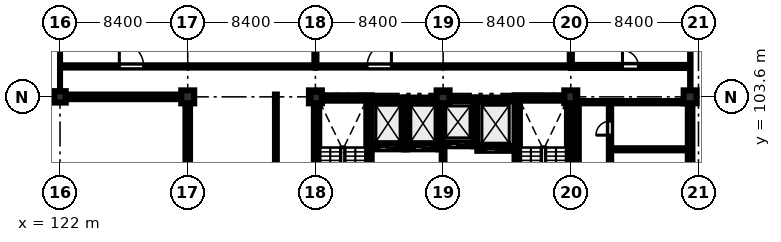
"""IFC4 building model, lengths in metres.
Left out: names, types, materials, properties, quantities, classifications, styles, units other than length and angle.
Written with IfcOpenShell. Run it as: python <this file> out.ifc"""

import sys

from ifc_helpers import new_model, si_unit, direction, frame, frame_2d, origin, origin_2d, place, context, subcontext, project, spatial, rectangle, extrude, element, fill, save


model = new_model("IFC4")
c1 = context("Model", 3, precision=1e-05, world=origin(), true_north=direction((0.0, 1.0)))
c2 = subcontext(c1, "Body", "Model", "MODEL_VIEW")
j1 = project(units=[si_unit("LENGTHUNIT", "METRE"), si_unit("PLANEANGLEUNIT", "RADIAN")], contexts=[c1])
p1 = place(None, origin())
s1 = spatial("IfcSite", under=j1, at=p1, CompositionType="ELEMENT")
p2 = place(p1, origin())
s2 = spatial("IfcBuilding", under=s1, at=p2, CompositionType="ELEMENT")
p3 = place(p2, frame((0.0, 0.0, 31.8)))
s3 = spatial("IfcBuildingStorey", under=s2, at=p3, CompositionType="ELEMENT", Elevation=31.8)
p4 = place(p3, frame((122.0, 103.6, 0.0), z_axis=(0.0, 0.0, 1.0), x_axis=(1.0, 0.0, 0.0)))
e1 = element("IfcColumn", 1, at=p4, inside=s3, PredefinedType="COLUMN", context=c2, shape_type="SweptSolid", body=[
    extrude(rectangle(XDim=0.75, YDim=0.75, at=origin_2d()), origin(), (0.0, 0.0, 1.0), 4.02),
])
for number, where, z_axis, x_axis in (
    (2, (130.4, 103.6, 0.0), (0.0, 0.0, 1.0), (1.0, 0.0, 0.0)),
    (3, (138.8, 103.6, 0.0), (0.0, 0.0, 1.0), (1.0, 0.0, 0.0)),
    (4, (147.2, 103.6, 0.0), (0.0, 0.0, 1.0), (1.0, 0.0, 0.0)),
    (5, (155.6, 103.6, 0.0), (0.0, 0.0, 1.0), (1.0, 0.0, 0.0)),
    (6, (163.45, 103.6, 0.0), (0.0, 0.0, 1.0), (1.0, 0.0, 0.0)),
):
    element("IfcColumn", number, at=place(p3, frame(where, z_axis=z_axis, x_axis=x_axis)), inside=s3, PredefinedType="COLUMN", context=c2, shape_type="SweptSolid", body=[
        extrude(rectangle(XDim=0.85, YDim=0.85, at=origin_2d()), origin(), (0.0, 0.0, 1.0), 4.02),
    ])
p5 = place(p3, frame((138.7, 103.525, 0.0), z_axis=(0.0, 0.0, 1.0), x_axis=(1.0, 0.0, 0.0)))
e7 = element("IfcWall", 7, at=p5, inside=s3, PredefinedType="SHEAR", context=c2, shape_type="SweptSolid", body=[
    extrude(rectangle(XDim=3.8, YDim=0.35, at=frame_2d((1.9, 0.0))), origin(), (0.0, 0.0, 1.0), 4.02),
])
p6 = place(p3, frame((138.875, 95.45, 0.0), z_axis=(0.0, 0.0, 1.0), x_axis=(0.0, 1.0, 0.0)))
e8 = element("IfcWall", 8, at=p6, inside=s3, PredefinedType="SHEAR", context=c2, shape_type="SweptSolid", body=[
    extrude(rectangle(XDim=7.9, YDim=0.35, at=frame_2d((3.95, 0.0))), origin(), (0.0, 0.0, 1.0), 4.02),
])
p7 = place(p3, frame((142.325, 95.45, 0.0), z_axis=(0.0, 0.0, 1.0), x_axis=(0.0, 1.0, 0.0)))
e9 = element("IfcWall", 9, at=p7, inside=s3, PredefinedType="SHEAR", context=c2, shape_type="SweptSolid", body=[
    extrude(rectangle(XDim=7.9, YDim=0.35, at=frame_2d((3.95, 0.0))), origin(), (0.0, 0.0, 1.0), 4.02),
])
p8 = place(p7, frame((0.22, 0.0, 0.0)))
e10 = element("IfcOpeningElement", 10, at=p8, cuts=e9, PredefinedType="OPENING", context=c2, shape_type="SweptSolid", body=[
    extrude(rectangle(XDim=1.15, YDim=2.15, at=frame_2d((0.575, 1.075))), frame((0.0, 0.185, 0.0), z_axis=(0.0, -1.0, 0.0), x_axis=(1.0, 0.0, 0.0)), (0.0, 0.0, 1.0), 0.37),
])
p9 = place(p3, frame((151.9, 103.525, 0.0), z_axis=(0.0, 0.0, 1.0), x_axis=(1.0, 0.0, 0.0)))
e11 = element("IfcWall", 11, at=p9, inside=s3, PredefinedType="SHEAR", context=c2, shape_type="SweptSolid", body=[
    extrude(rectangle(XDim=3.8, YDim=0.35, at=frame_2d((1.9, 0.0))), origin(), (0.0, 0.0, 1.0), 4.02),
])
p10 = place(p3, frame((152.075, 95.45, 0.0), z_axis=(0.0, 0.0, 1.0), x_axis=(0.0, 1.0, 0.0)))
e12 = element("IfcWall", 12, at=p10, inside=s3, PredefinedType="SHEAR", context=c2, shape_type="SweptSolid", body=[
    extrude(rectangle(XDim=7.9, YDim=0.35, at=frame_2d((3.95, 0.0))), origin(), (0.0, 0.0, 1.0), 4.02),
])
p11 = place(p10, frame((0.35, 0.0, 0.0)))
e13 = element("IfcOpeningElement", 13, at=p11, cuts=e12, PredefinedType="OPENING", context=c2, shape_type="SweptSolid", body=[
    extrude(rectangle(XDim=1.15, YDim=2.15, at=frame_2d((0.575, 1.075))), frame((0.0, 0.185, 0.0), z_axis=(0.0, -1.0, 0.0), x_axis=(1.0, 0.0, 0.0)), (0.0, 0.0, 1.0), 0.37),
])
p12 = place(p3, frame((155.525, 95.45, 0.0), z_axis=(0.0, 0.0, 1.0), x_axis=(0.0, 1.0, 0.0)))
e14 = element("IfcWall", 14, at=p12, inside=s3, PredefinedType="SHEAR", context=c2, shape_type="SweptSolid", body=[
    extrude(rectangle(XDim=7.9, YDim=0.35, at=frame_2d((3.95, 0.0))), origin(), (0.0, 0.0, 1.0), 4.02),
])
p13 = place(p3, frame((142.5, 100.275, 0.0), z_axis=(0.0, 0.0, 1.0), x_axis=(1.0, 0.0, 0.0)))
e15 = element("IfcWall", 15, at=p13, inside=s3, PredefinedType="SHEAR", context=c2, shape_type="SweptSolid", body=[
    extrude(rectangle(XDim=2.1, YDim=0.25, at=frame_2d((1.05, 0.0))), origin(), (0.0, 0.0, 1.0), 4.02),
])
p14 = place(p13, frame((0.5, 0.0, 0.0)))
e16 = element("IfcOpeningElement", 16, at=p14, cuts=e15, PredefinedType="OPENING", context=c2, shape_type="SweptSolid", body=[
    extrude(rectangle(XDim=1.1, YDim=2.15, at=frame_2d((0.55, 1.075))), frame((0.0, 0.135, 0.0), z_axis=(0.0, -1.0, 0.0), x_axis=(1.0, 0.0, 0.0)), (0.0, 0.0, 1.0), 0.27),
])
p15 = place(p3, frame((142.5, 103.425, 0.0), z_axis=(0.0, 0.0, 1.0), x_axis=(1.0, 0.0, 0.0)))
e17 = element("IfcWall", 17, at=p15, inside=s3, PredefinedType="SHEAR", context=c2, shape_type="SweptSolid", body=[
    extrude(rectangle(XDim=2.1, YDim=0.25, at=frame_2d((1.05, 0.0))), origin(), (0.0, 0.0, 1.0), 4.02),
])
p16 = place(p3, frame((144.725, 100.15, 0.0), z_axis=(0.0, 0.0, 1.0), x_axis=(0.0, 1.0, 0.0)))
e18 = element("IfcWall", 18, at=p16, inside=s3, PredefinedType="SHEAR", context=c2, shape_type="SweptSolid", body=[
    extrude(rectangle(XDim=3.4, YDim=0.25, at=frame_2d((1.7, 0.0))), origin(), (0.0, 0.0, 1.0), 4.02),
])
p17 = place(p3, frame((144.85, 100.275, 0.0), z_axis=(0.0, 0.0, 1.0), x_axis=(1.0, 0.0, 0.0)))
e19 = element("IfcWall", 19, at=p17, inside=s3, PredefinedType="SHEAR", context=c2, shape_type="SweptSolid", body=[
    extrude(rectangle(XDim=2.05, YDim=0.25, at=frame_2d((1.025, 0.0))), origin(), (0.0, 0.0, 1.0), 4.02),
])
p18 = place(p17, frame((0.465, 0.0, 0.0)))
e20 = element("IfcOpeningElement", 20, at=p18, cuts=e19, PredefinedType="OPENING", context=c2, shape_type="SweptSolid", body=[
    extrude(rectangle(XDim=1.12, YDim=2.15, at=frame_2d((0.56, 1.075))), frame((0.0, 0.135, 0.0), z_axis=(0.0, -1.0, 0.0), x_axis=(1.0, 0.0, 0.0)), (0.0, 0.0, 1.0), 0.27),
])
p19 = place(p3, frame((144.85, 103.425, 0.0), z_axis=(0.0, 0.0, 1.0), x_axis=(1.0, 0.0, 0.0)))
e21 = element("IfcWall", 21, at=p19, inside=s3, PredefinedType="SHEAR", context=c2, shape_type="SweptSolid", body=[
    extrude(rectangle(XDim=2.05, YDim=0.25, at=frame_2d((1.025, 0.0))), origin(), (0.0, 0.0, 1.0), 4.02),
])
p20 = place(p3, frame((147.025, 100.15, 0.0), z_axis=(0.0, 0.0, 1.0), x_axis=(0.0, 1.0, 0.0)))
e22 = element("IfcWall", 22, at=p20, inside=s3, PredefinedType="SHEAR", context=c2, shape_type="SweptSolid", body=[
    extrude(rectangle(XDim=3.4, YDim=0.25, at=frame_2d((1.7, 0.0))), origin(), (0.0, 0.0, 1.0), 4.02),
])
p21 = place(p3, frame((147.15, 100.475, 0.0), z_axis=(0.0, 0.0, 1.0), x_axis=(1.0, 0.0, 0.0)))
e23 = element("IfcWall", 23, at=p21, inside=s3, PredefinedType="SHEAR", context=c2, shape_type="SweptSolid", body=[
    extrude(rectangle(XDim=2.05, YDim=0.25, at=frame_2d((1.025, 0.0))), origin(), (0.0, 0.0, 1.0), 4.02),
])
p22 = place(p21, frame((0.495, 0.0, 0.0)))
e24 = element("IfcOpeningElement", 24, at=p22, cuts=e23, PredefinedType="OPENING", context=c2, shape_type="SweptSolid", body=[
    extrude(rectangle(XDim=1.06, YDim=2.15, at=frame_2d((0.53, 1.075))), frame((0.0, 0.135, 0.0), z_axis=(0.0, -1.0, 0.0), x_axis=(1.0, 0.0, 0.0)), (0.0, 0.0, 1.0), 0.27),
])
p23 = place(p3, frame((147.15, 103.425, 0.0), z_axis=(0.0, 0.0, 1.0), x_axis=(1.0, 0.0, 0.0)))
e25 = element("IfcWall", 25, at=p23, inside=s3, PredefinedType="SHEAR", context=c2, shape_type="SweptSolid", body=[
    extrude(rectangle(XDim=2.05, YDim=0.25, at=frame_2d((1.025, 0.0))), origin(), (0.0, 0.0, 1.0), 4.02),
])
p24 = place(p3, frame((149.325, 100.35, 0.0), z_axis=(0.0, 0.0, 1.0), x_axis=(0.0, 1.0, 0.0)))
e26 = element("IfcWall", 26, at=p24, inside=s3, PredefinedType="SHEAR", context=c2, shape_type="SweptSolid", body=[
    extrude(rectangle(XDim=3.2, YDim=0.25, at=frame_2d((1.6, 0.0))), origin(), (0.0, 0.0, 1.0), 4.02),
])
p25 = place(p3, frame((149.45, 100.175, 0.0), z_axis=(0.0, 0.0, 1.0), x_axis=(1.0, 0.0, 0.0)))
e27 = element("IfcWall", 27, at=p25, inside=s3, PredefinedType="SHEAR", context=c2, shape_type="SweptSolid", body=[
    extrude(rectangle(XDim=2.45, YDim=0.25, at=frame_2d((1.225, 0.0))), origin(), (0.0, 0.0, 1.0), 4.02),
])
p26 = place(p25, frame((0.575, 0.0, 0.0)))
e28 = element("IfcOpeningElement", 28, at=p26, cuts=e27, PredefinedType="OPENING", context=c2, shape_type="SweptSolid", body=[
    extrude(rectangle(XDim=1.3, YDim=2.25, at=frame_2d((0.65, 1.125))), frame((0.0, 0.135, 0.0), z_axis=(0.0, -1.0, 0.0), x_axis=(1.0, 0.0, 0.0)), (0.0, 0.0, 1.0), 0.27),
])
p27 = place(p3, frame((149.45, 103.425, 0.0), z_axis=(0.0, 0.0, 1.0), x_axis=(1.0, 0.0, 0.0)))
e29 = element("IfcWall", 29, at=p27, inside=s3, PredefinedType="SHEAR", context=c2, shape_type="SweptSolid", body=[
    extrude(rectangle(XDim=2.45, YDim=0.25, at=frame_2d((1.225, 0.0))), origin(), (0.0, 0.0, 1.0), 4.02),
])
p28 = place(p3, frame((163.45, 103.175, 0.0), z_axis=(0.0, 0.0, 1.0), x_axis=(0.0, -1.0, 0.0)))
e30 = element("IfcWall", 30, at=p28, inside=s3, PredefinedType="STANDARD", context=c2, shape_type="SweptSolid", body=[
    extrude(rectangle(XDim=7.55, YDim=0.3, at=frame_2d((3.775, 0.0))), origin(), (0.0, 0.0, 1.0), 3.32),
])
p29 = place(p28, frame((1.15, 0.0, 1.1)))
e31 = element("IfcOpeningElement", 31, at=p29, cuts=e30, PredefinedType="OPENING", context=c2, shape_type="SweptSolid", body=[
    extrude(rectangle(XDim=1.4, YDim=1.4, at=frame_2d((0.7, 0.7))), frame((0.0, 0.16, 0.0), z_axis=(0.0, -1.0, 0.0), x_axis=(1.0, 0.0, 0.0)), (0.0, 0.0, 1.0), 0.32),
])
p30 = place(p3, frame((130.4, 95.625, 0.0), z_axis=(0.0, 0.0, 1.0), x_axis=(0.0, 1.0, 0.0)))
e32 = element("IfcWall", 32, at=p30, inside=s3, PredefinedType="STANDARD", context=c2, shape_type="SweptSolid", body=[
    extrude(rectangle(XDim=7.55, YDim=0.3, at=frame_2d((3.775, 0.0))), origin(), (0.0, 0.0, 1.0), 3.32),
])
p31 = place(p30, frame((2.4, 0.0, 1.0)))
e33 = element("IfcOpeningElement", 33, at=p31, cuts=e32, PredefinedType="OPENING", context=c2, shape_type="SweptSolid", body=[
    extrude(rectangle(XDim=1.8, YDim=1.8, at=frame_2d((0.9, 0.9))), frame((0.0, 0.16, 0.0), z_axis=(0.0, -1.0, 0.0), x_axis=(1.0, 0.0, 0.0)), (0.0, 0.0, 1.0), 0.32),
])
p32 = place(p3, frame((129.975, 103.6, 0.0), z_axis=(0.0, 0.0, 1.0), x_axis=(-1.0, 0.0, 0.0)))
e34 = element("IfcWall", 34, at=p32, inside=s3, PredefinedType="STANDARD", context=c2, shape_type="SweptSolid", body=[
    extrude(rectangle(XDim=7.6, YDim=0.3, at=frame_2d((3.8, 0.0))), origin(), (0.0, 0.0, 1.0), 3.32),
])
p33 = place(p3, frame((147.2, 95.75, 0.0), z_axis=(0.0, 0.0, 1.0), x_axis=(0.0, 1.0, 0.0)))
e35 = element("IfcWall", 35, at=p33, inside=s3, PredefinedType="STANDARD", context=c2, shape_type="SweptSolid", body=[
    extrude(rectangle(XDim=4.5, YDim=0.18, at=frame_2d((2.25, 0.0))), origin(), (0.0, 0.0, 1.0), 3.32),
])
p34 = place(p3, frame((158.18, 94.68, 0.0), z_axis=(0.0, 0.0, 1.0), x_axis=(0.0, 1.0, 0.0)))
e36 = element("IfcWall", 36, at=p34, inside=s3, PredefinedType="PARTITIONING", context=c2, shape_type="SweptSolid", body=[
    extrude(rectangle(XDim=8.57, YDim=0.15, at=frame_2d((4.285, 0.0))), origin(), (0.0, 0.0, 1.0), 4.02),
])
p35 = place(p34, frame((0.8, 0.0, 0.0)))
e37 = element("IfcOpeningElement", 37, at=p35, cuts=e36, PredefinedType="OPENING", context=c2, shape_type="SweptSolid", body=[
    extrude(rectangle(XDim=1.0, YDim=2.12, at=frame_2d((0.5, 1.06))), frame((0.0, 0.085, 0.0), z_axis=(0.0, -1.0, 0.0), x_axis=(1.0, 0.0, 0.0)), (0.0, 0.0, 1.0), 0.17),
])
p36 = place(p34, frame((3.5, 0.0, 0.0)))
e38 = element("IfcOpeningElement", 38, at=p36, cuts=e36, PredefinedType="OPENING", context=c2, shape_type="SweptSolid", body=[
    extrude(rectangle(XDim=0.92, YDim=2.1, at=frame_2d((0.46, 1.05))), frame((0.0, 0.085, 0.0), z_axis=(0.0, -1.0, 0.0), x_axis=(1.0, 0.0, 0.0)), (0.0, 0.0, 1.0), 0.17),
])
p37 = place(p34, frame((6.4, 0.0, 0.0)))
e39 = element("IfcOpeningElement", 39, at=p37, cuts=e36, PredefinedType="OPENING", context=c2, shape_type="SweptSolid", body=[
    extrude(rectangle(XDim=0.92, YDim=2.1, at=frame_2d((0.46, 1.05))), frame((0.0, 0.085, 0.0), z_axis=(0.0, -1.0, 0.0), x_axis=(1.0, 0.0, 0.0)), (0.0, 0.0, 1.0), 0.17),
])
p38 = place(p3, frame((158.18, 100.15, 0.0), z_axis=(0.0, 0.0, 1.0), x_axis=(1.0, 0.0, 0.0)))
e40 = element("IfcWall", 40, at=p38, inside=s3, PredefinedType="PARTITIONING", context=c2, shape_type="SweptSolid", body=[
    extrude(rectangle(XDim=5.02, YDim=0.135, at=frame_2d((2.51, 0.0))), origin(), (0.0, 0.0, 1.0), 4.02),
])
p39 = place(p3, frame((156.05, 103.25, 0.0), z_axis=(0.0, 0.0, 1.0), x_axis=(1.0, 0.0, 0.0)))
e41 = element("IfcWall", 41, at=p39, inside=s3, PredefinedType="PARTITIONING", context=c2, shape_type="SweptSolid", body=[
    extrude(rectangle(XDim=7.15, YDim=0.15, at=frame_2d((3.575, 0.0))), origin(), (0.0, 0.0, 1.0), 4.02),
])
p40 = place(p3, frame((156.05, 94.68, 0.0), z_axis=(0.0, 0.0, 1.0), x_axis=(0.0, 1.0, 0.0)))
e42 = element("IfcWall", 42, at=p40, inside=s3, PredefinedType="PARTITIONING", context=c2, shape_type="SweptSolid", body=[
    extrude(rectangle(XDim=8.57, YDim=0.15, at=frame_2d((4.285, 0.0))), origin(), (0.0, 0.0, 1.0), 4.02),
])
p41 = place(p3, frame((136.2, 94.68, 0.0), z_axis=(0.0, 0.0, 1.0), x_axis=(0.0, 1.0, 0.0)))
e43 = element("IfcWall", 43, at=p41, inside=s3, PredefinedType="PARTITIONING", context=c2, shape_type="SweptSolid", body=[
    extrude(rectangle(XDim=9.07, YDim=0.12, at=frame_2d((4.535, 0.0))), origin(), (0.0, 0.0, 1.0), 4.02),
])
p42 = place(p3, frame((122.15, 105.6, 0.0), z_axis=(0.0, 0.0, 1.0), x_axis=(1.0, 0.0, 0.0)))
e44 = element("IfcWall", 44, at=p42, inside=s3, PredefinedType="PARTITIONING", context=c2, shape_type="SweptSolid", body=[
    extrude(rectangle(XDim=16.65, YDim=0.145, at=frame_2d((8.325, 0.0))), origin(), (0.0, 0.0, 1.0), 4.02),
])
p43 = place(p42, frame((3.75, 0.0, 0.0)))
e45 = element("IfcOpeningElement", 45, at=p43, cuts=e44, PredefinedType="OPENING", context=c2, shape_type="SweptSolid", body=[
    extrude(rectangle(XDim=1.6, YDim=2.24, at=frame_2d((0.8, 1.12))), frame((0.0, 0.083, 0.0), z_axis=(0.0, -1.0, 0.0), x_axis=(1.0, 0.0, 0.0)), (0.0, 0.0, 1.0), 0.165),
])
p44 = place(p3, frame((138.8, 105.6, 0.0), z_axis=(0.0, 0.0, 1.0), x_axis=(1.0, 0.0, 0.0)))
e46 = element("IfcWall", 46, at=p44, inside=s3, PredefinedType="PARTITIONING", context=c2, shape_type="SweptSolid", body=[
    extrude(rectangle(XDim=16.8, YDim=0.145, at=frame_2d((8.4, 0.0))), origin(), (0.0, 0.0, 1.0), 4.02),
])
p45 = place(p44, frame((3.4, 0.0, 0.0)))
e47 = element("IfcOpeningElement", 47, at=p45, cuts=e46, PredefinedType="OPENING", context=c2, shape_type="SweptSolid", body=[
    extrude(rectangle(XDim=1.6, YDim=2.24, at=frame_2d((0.8, 1.12))), frame((0.0, 0.083, 0.0), z_axis=(0.0, -1.0, 0.0), x_axis=(1.0, 0.0, 0.0)), (0.0, 0.0, 1.0), 0.165),
])
p46 = place(p3, frame((138.8, 105.6, 0.0), z_axis=(0.0, 0.0, 1.0), x_axis=(0.0, 1.0, 0.0)))
e48 = element("IfcWall", 48, at=p46, inside=s3, PredefinedType="PARTITIONING", context=c2, shape_type="SweptSolid", body=[
    extrude(rectangle(XDim=5.75, YDim=0.135, at=frame_2d((2.875, 0.0))), origin(), (0.0, 0.0, 1.0), 3.32),
])
p47 = place(p3, frame((155.6, 105.6, 0.0), z_axis=(0.0, 0.0, 1.0), x_axis=(1.0, 0.0, 0.0)))
e49 = element("IfcWall", 49, at=p47, inside=s3, PredefinedType="SOLIDWALL", context=c2, shape_type="SweptSolid", body=[
    extrude(rectangle(XDim=7.75, YDim=0.2, at=frame_2d((3.875, 0.0))), origin(), (0.0, 0.0, 1.0), 4.02),
])
p48 = place(p47, frame((3.4, 0.0, 0.0)))
e50 = element("IfcOpeningElement", 50, at=p48, cuts=e49, PredefinedType="OPENING", context=c2, shape_type="SweptSolid", body=[
    extrude(rectangle(XDim=1.05, YDim=2.15, at=frame_2d((0.525, 1.075))), frame((0.0, 0.11, 0.0), z_axis=(0.0, -1.0, 0.0), x_axis=(1.0, 0.0, 0.0)), (0.0, 0.0, 1.0), 0.22),
])
p49 = place(p3, frame((155.6, 105.6, 0.0), z_axis=(0.0, 0.0, 1.0), x_axis=(0.0, 1.0, 0.0)))
e51 = element("IfcWall", 51, at=p49, inside=s3, PredefinedType="PARTITIONING", context=c2, shape_type="SweptSolid", body=[
    extrude(rectangle(XDim=5.75, YDim=0.135, at=frame_2d((2.875, 0.0))), origin(), (0.0, 0.0, 1.0), 3.32),
])
p50 = place(p29, origin())
e52 = element("IfcWindow", 52, at=p50, inside=s3, PartitioningType="SINGLE_PANEL", PredefinedType="WINDOW", context=c2, shape_type="SweptSolid", body=[
    extrude(rectangle(XDim=1.4, YDim=1.4, at=frame_2d((0.7, 0.7))), frame((0.0, 0.03, 0.0), z_axis=(0.0, -1.0, 0.0), x_axis=(1.0, 0.0, 0.0)), (0.0, 0.0, 1.0), 0.06),
])
fill(e31, e52)
p51 = place(p31, origin())
e53 = element("IfcWindow", 53, at=p51, inside=s3, PartitioningType="DOUBLE_PANEL_VERTICAL", PredefinedType="WINDOW", context=c2, shape_type="SweptSolid", body=[
    extrude(rectangle(XDim=1.8, YDim=1.8, at=frame_2d((0.9, 0.9))), frame((0.0, 0.03, 0.0), z_axis=(0.0, -1.0, 0.0), x_axis=(1.0, 0.0, 0.0)), (0.0, 0.0, 1.0), 0.06),
])
fill(e33, e53)
p52 = place(p37, origin())
e54 = element("IfcDoor", 54, at=p52, inside=s3, OperationType="SINGLE_SWING_LEFT", PredefinedType="DOOR", context=c2, shape_type="SweptSolid", body=[
    extrude(rectangle(XDim=0.92, YDim=2.1, at=frame_2d((0.46, 1.05))), frame((0.0, 0.025, 0.0), z_axis=(0.0, -1.0, 0.0), x_axis=(1.0, 0.0, 0.0)), (0.0, 0.0, 1.0), 0.05),
])
fill(e39, e54)
p53 = place(p43, origin())
e55 = element("IfcDoor", 55, at=p53, inside=s3, OperationType="SINGLE_SWING_LEFT", PredefinedType="DOOR", context=c2, shape_type="SweptSolid", body=[
    extrude(rectangle(XDim=1.6, YDim=2.24, at=frame_2d((0.8, 1.12))), frame((0.0, 0.025, 0.0), z_axis=(0.0, -1.0, 0.0), x_axis=(1.0, 0.0, 0.0)), (0.0, 0.0, 1.0), 0.05),
])
fill(e45, e55)
p54 = place(p45, origin())
e56 = element("IfcDoor", 56, at=p54, inside=s3, OperationType="SINGLE_SWING_RIGHT", PredefinedType="DOOR", context=c2, shape_type="SweptSolid", body=[
    extrude(rectangle(XDim=1.6, YDim=2.24, at=frame_2d((0.8, 1.12))), frame((0.0, 0.025, 0.0), z_axis=(0.0, -1.0, 0.0), x_axis=(1.0, 0.0, 0.0)), (0.0, 0.0, 1.0), 0.05),
])
fill(e47, e56)
p55 = place(p48, origin())
e57 = element("IfcDoor", 57, at=p55, inside=s3, OperationType="SINGLE_SWING_LEFT", PredefinedType="DOOR", context=c2, shape_type="SweptSolid", body=[
    extrude(rectangle(XDim=1.05, YDim=2.15, at=frame_2d((0.525, 1.075))), frame((0.0, 0.025, 0.0), z_axis=(0.0, -1.0, 0.0), x_axis=(1.0, 0.0, 0.0)), (0.0, 0.0, 1.0), 0.05),
])
fill(e50, e57)
p56 = place(p14, origin())
e58 = element("IfcDoor", 58, at=p56, inside=s3, OperationType="SLIDING_TO_LEFT", PredefinedType="DOOR", context=c2, shape_type="SweptSolid", body=[
    extrude(rectangle(XDim=1.1, YDim=2.15, at=frame_2d((0.55, 1.075))), frame((0.0, 0.025, 0.0), z_axis=(0.0, -1.0, 0.0), x_axis=(1.0, 0.0, 0.0)), (0.0, 0.0, 1.0), 0.05),
])
fill(e16, e58)
p57 = place(p18, origin())
e59 = element("IfcDoor", 59, at=p57, inside=s3, OperationType="SLIDING_TO_LEFT", PredefinedType="DOOR", context=c2, shape_type="SweptSolid", body=[
    extrude(rectangle(XDim=1.12, YDim=2.15, at=frame_2d((0.56, 1.075))), frame((0.0, 0.025, 0.0), z_axis=(0.0, -1.0, 0.0), x_axis=(1.0, 0.0, 0.0)), (0.0, 0.0, 1.0), 0.05),
])
fill(e20, e59)
p58 = place(p22, origin())
e60 = element("IfcDoor", 60, at=p58, inside=s3, OperationType="SLIDING_TO_LEFT", PredefinedType="DOOR", context=c2, shape_type="SweptSolid", body=[
    extrude(rectangle(XDim=1.06, YDim=2.15, at=frame_2d((0.53, 1.075))), frame((0.0, 0.025, 0.0), z_axis=(0.0, -1.0, 0.0), x_axis=(1.0, 0.0, 0.0)), (0.0, 0.0, 1.0), 0.05),
])
fill(e24, e60)
p59 = place(p26, origin())
e61 = element("IfcDoor", 61, at=p59, inside=s3, OperationType="SLIDING_TO_LEFT", PredefinedType="DOOR", context=c2, shape_type="SweptSolid", body=[
    extrude(rectangle(XDim=1.3, YDim=2.25, at=frame_2d((0.65, 1.125))), frame((0.0, 0.025, 0.0), z_axis=(0.0, -1.0, 0.0), x_axis=(1.0, 0.0, 0.0)), (0.0, 0.0, 1.0), 0.05),
])
fill(e28, e61)
save(model, sys.argv[1])
